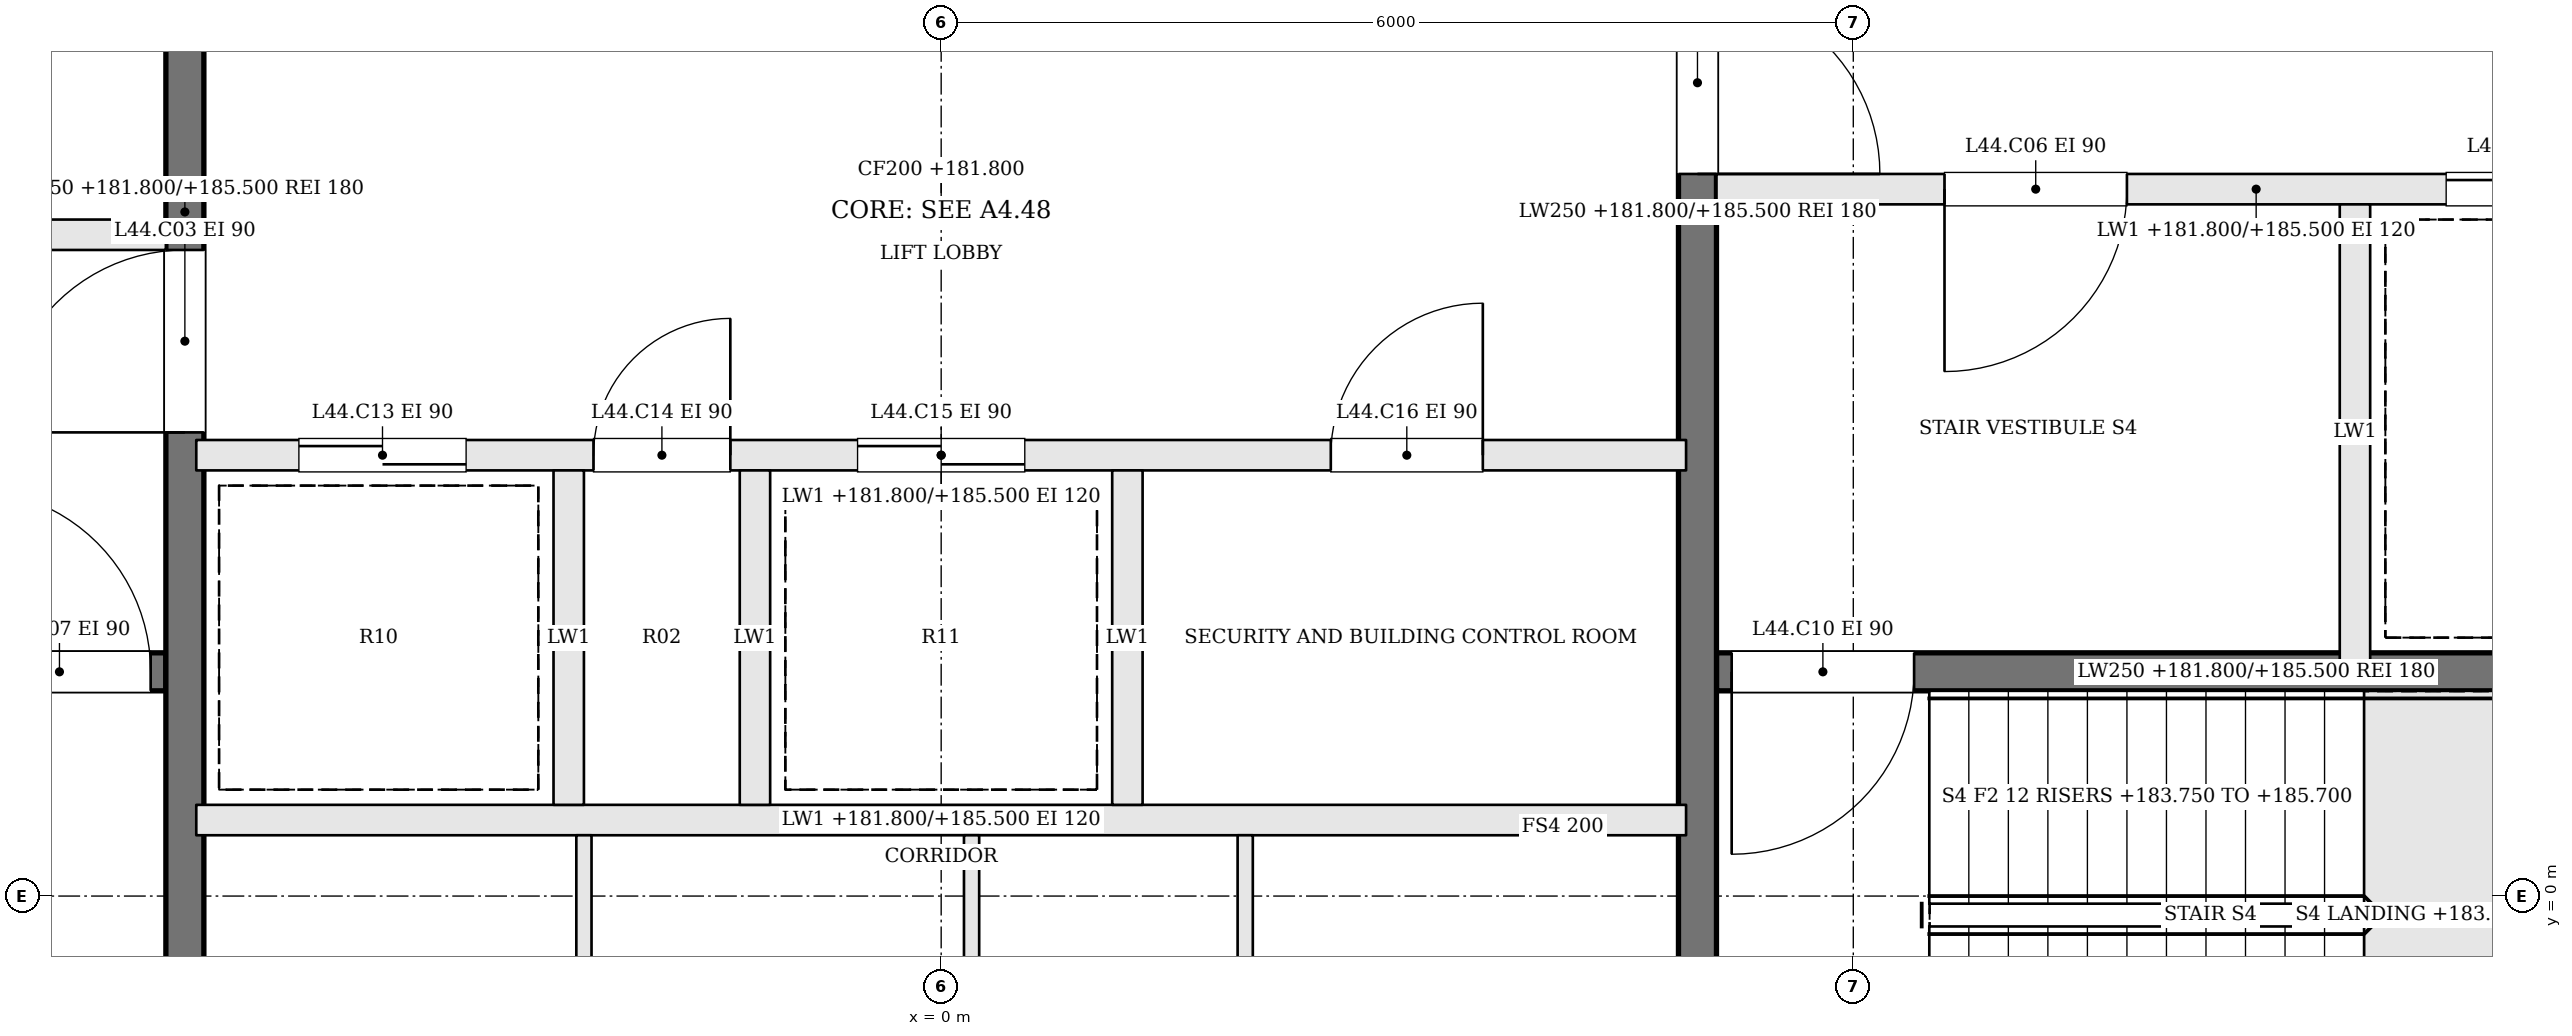
"""IFC4 building model, lengths in metres.
Left out: names, types, materials, properties, quantities, classifications, styles, units other than length and angle.
Written with IfcOpenShell. Run it as: python <this file> out.ifc"""

import sys

from ifc_helpers import new_model, si_unit, direction, frame, frame_2d, origin, place, context, subcontext, project, spatial, rectangle, extrude, element, fill, save


model = new_model("IFC4")
c1 = context("Model", 3, precision=1e-05, world=origin(), true_north=direction((0.0, 1.0)))
c2 = subcontext(c1, "Body", "Model", "MODEL_VIEW")
j1 = project(units=[si_unit("LENGTHUNIT", "METRE"), si_unit("PLANEANGLEUNIT", "RADIAN")], contexts=[c1])
p1 = place(None, origin())
s1 = spatial("IfcSite", under=j1, at=p1, CompositionType="ELEMENT")
p2 = place(p1, origin())
s2 = spatial("IfcBuilding", under=s1, at=p2, CompositionType="ELEMENT")
p3 = place(p2, frame((0.0, 0.0, 181.8)))
s3 = spatial("IfcBuildingStorey", under=s2, at=p3, CompositionType="ELEMENT", Elevation=181.8)
p4 = place(p3, frame((-12.2, 1.475, 0.0), z_axis=(0.0, 0.0, 1.0), x_axis=(1.0, 0.0, 0.0)))
e1 = element("IfcWall", 1, at=p4, inside=s3, PredefinedType="SOLIDWALL", context=c2, shape_type="SweptSolid", body=[
    extrude(rectangle(XDim=7.1, YDim=0.25, at=frame_2d((3.55, 0.0))), origin(), (0.0, 0.0, 1.0), 3.7),
])
p5 = place(p4, frame((5.8, 0.0, 0.0)))
e2 = element("IfcOpeningElement", 2, at=p5, cuts=e1, PredefinedType="OPENING", context=c2, shape_type="SweptSolid", body=[
    extrude(rectangle(XDim=1.2, YDim=2.1, at=frame_2d((0.6, 1.05))), frame((0.0, 0.135, 0.0), z_axis=(0.0, -1.0, 0.0), x_axis=(1.0, 0.0, 0.0)), (0.0, 0.0, 1.0), 0.27),
])
p6 = place(p3, frame((-12.2, 4.35, 0.0), z_axis=(0.0, 0.0, 1.0), x_axis=(1.0, 0.0, 0.0)))
e3 = element("IfcWall", 3, at=p6, inside=s3, PredefinedType="SOLIDWALL", context=c2, shape_type="SweptSolid", body=[
    extrude(rectangle(XDim=7.1, YDim=0.2, at=frame_2d((3.55, 0.0))), origin(), (0.0, 0.0, 1.0), 3.7),
])
p7 = place(p6, frame((4.4, 0.0, 0.0)))
e4 = element("IfcOpeningElement", 4, at=p7, cuts=e3, PredefinedType="OPENING", context=c2, shape_type="SweptSolid", body=[
    extrude(rectangle(XDim=1.2, YDim=2.1, at=frame_2d((0.6, 1.05))), frame((0.0, 0.11, 0.0), z_axis=(0.0, -1.0, 0.0), x_axis=(1.0, 0.0, 0.0)), (0.0, 0.0, 1.0), 0.22),
])
p8 = place(p6, frame((1.1, 0.0, 0.0)))
e5 = element("IfcOpeningElement", 5, at=p8, cuts=e3, PredefinedType="OPENING", context=c2, shape_type="SweptSolid", body=[
    extrude(rectangle(XDim=1.2, YDim=2.1, at=frame_2d((0.6, 1.05))), frame((0.0, 0.11, 0.0), z_axis=(0.0, -1.0, 0.0), x_axis=(1.0, 0.0, 0.0)), (0.0, 0.0, 1.0), 0.22),
])
p9 = place(p3, frame((12.2, 4.65, 0.0), z_axis=(0.0, 0.0, 1.0), x_axis=(-1.0, 0.0, 0.0)))
e6 = element("IfcWall", 6, at=p9, inside=s3, PredefinedType="SOLIDWALL", context=c2, shape_type="SweptSolid", body=[
    extrude(rectangle(XDim=7.1, YDim=0.2, at=frame_2d((3.55, 0.0))), origin(), (0.0, 0.0, 1.0), 3.7),
])
p10 = place(p9, frame((4.4, 0.0, 0.0)))
e7 = element("IfcOpeningElement", 7, at=p10, cuts=e6, PredefinedType="OPENING", context=c2, shape_type="SweptSolid", body=[
    extrude(rectangle(XDim=1.2, YDim=2.1, at=frame_2d((0.6, 1.05))), frame((0.0, 0.11, 0.0), z_axis=(0.0, -1.0, 0.0), x_axis=(1.0, 0.0, 0.0)), (0.0, 0.0, 1.0), 0.22),
])
p11 = place(p9, frame((1.1, 0.0, 0.0)))
e8 = element("IfcOpeningElement", 8, at=p11, cuts=e6, PredefinedType="OPENING", context=c2, shape_type="SweptSolid", body=[
    extrude(rectangle(XDim=1.2, YDim=2.1, at=frame_2d((0.6, 1.05))), frame((0.0, 0.11, 0.0), z_axis=(0.0, -1.0, 0.0), x_axis=(1.0, 0.0, 0.0)), (0.0, 0.0, 1.0), 0.22),
])
p12 = place(p3, frame((12.2, 1.475, 0.0), z_axis=(0.0, 0.0, 1.0), x_axis=(-1.0, 0.0, 0.0)))
e9 = element("IfcWall", 9, at=p12, inside=s3, PredefinedType="SOLIDWALL", context=c2, shape_type="SweptSolid", body=[
    extrude(rectangle(XDim=7.1, YDim=0.25, at=frame_2d((3.55, 0.0))), origin(), (0.0, 0.0, 1.0), 3.7),
])
p13 = place(p12, frame((5.8, 0.0, 0.0)))
e10 = element("IfcOpeningElement", 10, at=p13, cuts=e9, PredefinedType="OPENING", context=c2, shape_type="SweptSolid", body=[
    extrude(rectangle(XDim=1.2, YDim=2.1, at=frame_2d((0.6, 1.05))), frame((0.0, 0.135, 0.0), z_axis=(0.0, -1.0, 0.0), x_axis=(1.0, 0.0, 0.0)), (0.0, 0.0, 1.0), 0.27),
])
p14 = place(p3, frame((9.3, 4.55, 0.0), z_axis=(0.0, 0.0, 1.0), x_axis=(0.0, -1.0, 0.0)))
e11 = element("IfcWall", 11, at=p14, inside=s3, PredefinedType="SOLIDWALL", context=c2, shape_type="SweptSolid", body=[
    extrude(rectangle(XDim=3.0, YDim=0.2, at=frame_2d((1.5, 0.0))), origin(), (0.0, 0.0, 1.0), 3.7),
])
p15 = place(p3, frame((-4.975, -2.2, 0.0), z_axis=(0.0, 0.0, 1.0), x_axis=(0.0, 1.0, 0.0)))
e12 = element("IfcWall", 12, at=p15, inside=s3, PredefinedType="SOLIDWALL", context=c2, shape_type="SweptSolid", body=[
    extrude(rectangle(XDim=13.4, YDim=0.25, at=frame_2d((6.7, 0.0))), origin(), (0.0, 0.0, 1.0), 3.7),
])
p16 = place(p15, frame((5.25, 0.0, 0.0)))
e13 = element("IfcOpeningElement", 13, at=p16, cuts=e12, PredefinedType="OPENING", context=c2, shape_type="SweptSolid", body=[
    extrude(rectangle(XDim=1.2, YDim=2.1, at=frame_2d((0.6, 1.05))), frame((0.0, 0.135, 0.0), z_axis=(0.0, -1.0, 0.0), x_axis=(1.0, 0.0, 0.0)), (0.0, 0.0, 1.0), 0.27),
])
p17 = place(p3, frame((4.975, 11.2, 0.0), z_axis=(0.0, 0.0, 1.0), x_axis=(0.0, -1.0, 0.0)))
e14 = element("IfcWall", 14, at=p17, inside=s3, PredefinedType="SOLIDWALL", context=c2, shape_type="SweptSolid", body=[
    extrude(rectangle(XDim=13.4, YDim=0.25, at=frame_2d((6.7, 0.0))), origin(), (0.0, 0.0, 1.0), 3.7),
])
p18 = place(p17, frame((5.25, 0.0, 0.0)))
e15 = element("IfcOpeningElement", 15, at=p18, cuts=e14, PredefinedType="OPENING", context=c2, shape_type="SweptSolid", body=[
    extrude(rectangle(XDim=1.2, YDim=2.1, at=frame_2d((0.6, 1.05))), frame((0.0, 0.135, 0.0), z_axis=(0.0, -1.0, 0.0), x_axis=(1.0, 0.0, 0.0)), (0.0, 0.0, 1.0), 0.27),
])
p19 = place(p3, frame((-4.9, 0.5, 0.0), z_axis=(0.0, 0.0, 1.0), x_axis=(1.0, 0.0, 0.0)))
e16 = element("IfcWall", 16, at=p19, inside=s3, PredefinedType="SOLIDWALL", context=c2, shape_type="SweptSolid", body=[
    extrude(rectangle(XDim=9.8, YDim=0.2, at=frame_2d((4.9, 0.0))), origin(), (0.0, 0.0, 1.0), 3.7),
])
p20 = place(p3, frame((-4.9, 2.9, 0.0), z_axis=(0.0, 0.0, 1.0), x_axis=(1.0, 0.0, 0.0)))
e17 = element("IfcWall", 17, at=p20, inside=s3, PredefinedType="SOLIDWALL", context=c2, shape_type="SweptSolid", body=[
    extrude(rectangle(XDim=9.8, YDim=0.2, at=frame_2d((4.9, 0.0))), origin(), (0.0, 0.0, 1.0), 3.7),
])
p21 = place(p20, frame((0.675, 0.0, 0.0)))
e18 = element("IfcOpeningElement", 18, at=p21, cuts=e17, PredefinedType="OPENING", context=c2, shape_type="SweptSolid", body=[
    extrude(rectangle(XDim=1.1, YDim=2.1, at=frame_2d((0.55, 1.05))), frame((0.0, 0.11, 0.0), z_axis=(0.0, -1.0, 0.0), x_axis=(1.0, 0.0, 0.0)), (0.0, 0.0, 1.0), 0.22),
])
p22 = place(p20, frame((2.613, 0.0, 0.0)))
e19 = element("IfcOpeningElement", 19, at=p22, cuts=e17, PredefinedType="OPENING", context=c2, shape_type="SweptSolid", body=[
    extrude(rectangle(XDim=0.9, YDim=2.1, at=frame_2d((0.45, 1.05))), frame((0.0, 0.11, 0.0), z_axis=(0.0, -1.0, 0.0), x_axis=(1.0, 0.0, 0.0)), (0.0, 0.0, 1.0), 0.22),
])
p23 = place(p20, frame((4.35, 0.0, 0.0)))
e20 = element("IfcOpeningElement", 20, at=p23, cuts=e17, PredefinedType="OPENING", context=c2, shape_type="SweptSolid", body=[
    extrude(rectangle(XDim=1.1, YDim=2.1, at=frame_2d((0.55, 1.05))), frame((0.0, 0.11, 0.0), z_axis=(0.0, -1.0, 0.0), x_axis=(1.0, 0.0, 0.0)), (0.0, 0.0, 1.0), 0.22),
])
p24 = place(p20, frame((7.463, 0.0, 0.0)))
e21 = element("IfcOpeningElement", 21, at=p24, cuts=e17, PredefinedType="OPENING", context=c2, shape_type="SweptSolid", body=[
    extrude(rectangle(XDim=1.0, YDim=2.1, at=frame_2d((0.5, 1.05))), frame((0.0, 0.11, 0.0), z_axis=(0.0, -1.0, 0.0), x_axis=(1.0, 0.0, 0.0)), (0.0, 0.0, 1.0), 0.22),
])
for number, where, z_axis, x_axis in (
    (22, (-2.45, 0.6, 0.0), (0.0, 0.0, 1.0), (0.0, 1.0, 0.0)),
    (23, (-1.225, 0.6, 0.0), (0.0, 0.0, 1.0), (0.0, 1.0, 0.0)),
    (24, (1.225, 0.6, 0.0), (0.0, 0.0, 1.0), (0.0, 1.0, 0.0)),
):
    element("IfcWall", number, at=place(p3, frame(where, z_axis=z_axis, x_axis=x_axis)), inside=s3, PredefinedType="SOLIDWALL", context=c2, shape_type="SweptSolid", body=[
        extrude(rectangle(XDim=2.2, YDim=0.2, at=frame_2d((1.1, 0.0))), origin(), (0.0, 0.0, 1.0), 3.7),
    ])
for number, where, z_axis, x_axis in (
    (25, (-2.35, -2.2, 0.0), (0.0, 0.0, 1.0), (0.0, 1.0, 0.0)),
    (26, (0.2, -2.2, 0.0), (0.0, 0.0, 1.0), (0.0, 1.0, 0.0)),
    (27, (2.0, -2.2, 0.0), (0.0, 0.0, 1.0), (0.0, 1.0, 0.0)),
):
    element("IfcWall", number, at=place(p3, frame(where, z_axis=z_axis, x_axis=x_axis)), inside=s3, PredefinedType="PARTITIONING", context=c2, shape_type="SweptSolid", body=[
        extrude(rectangle(XDim=2.6, YDim=0.1, at=frame_2d((1.3, 0.0))), origin(), (0.0, 0.0, 1.0), 3.7),
    ])
p25 = place(p16, origin())
e28 = element("IfcDoor", 28, at=p25, inside=s3, OperationType="SINGLE_SWING_LEFT", PredefinedType="DOOR", context=c2, shape_type="SweptSolid", body=[
    extrude(rectangle(XDim=1.2, YDim=2.1, at=frame_2d((0.6, 1.05))), frame((0.0, 0.025, 0.0), z_axis=(0.0, -1.0, 0.0), x_axis=(1.0, 0.0, 0.0)), (0.0, 0.0, 1.0), 0.05),
])
fill(e13, e28)
p26 = place(p18, origin())
e29 = element("IfcDoor", 29, at=p26, inside=s3, OperationType="SINGLE_SWING_RIGHT", PredefinedType="DOOR", context=c2, shape_type="SweptSolid", body=[
    extrude(rectangle(XDim=1.2, YDim=2.1, at=frame_2d((0.6, 1.05))), frame((0.0, 0.025, 0.0), z_axis=(0.0, -1.0, 0.0), x_axis=(1.0, 0.0, 0.0)), (0.0, 0.0, 1.0), 0.05),
])
fill(e15, e29)
p27 = place(p10, origin())
e30 = element("IfcDoor", 30, at=p27, inside=s3, OperationType="SINGLE_SWING_RIGHT", PredefinedType="DOOR", context=c2, shape_type="SweptSolid", body=[
    extrude(rectangle(XDim=1.2, YDim=2.1, at=frame_2d((0.6, 1.05))), frame((0.0, 0.025, 0.0), z_axis=(0.0, -1.0, 0.0), x_axis=(1.0, 0.0, 0.0)), (0.0, 0.0, 1.0), 0.05),
])
fill(e7, e30)
p28 = place(p5, origin())
e31 = element("IfcDoor", 31, at=p28, inside=s3, OperationType="SINGLE_SWING_LEFT", PredefinedType="DOOR", context=c2, shape_type="SweptSolid", body=[
    extrude(rectangle(XDim=1.2, YDim=2.1, at=frame_2d((0.6, 1.05))), frame((0.0, 0.025, 0.0), z_axis=(0.0, -1.0, 0.0), x_axis=(1.0, 0.0, 0.0)), (0.0, 0.0, 1.0), 0.05),
])
fill(e2, e31)
p29 = place(p13, origin())
e32 = element("IfcDoor", 32, at=p29, inside=s3, OperationType="SINGLE_SWING_RIGHT", PredefinedType="DOOR", context=c2, shape_type="SweptSolid", body=[
    extrude(rectangle(XDim=1.2, YDim=2.1, at=frame_2d((0.6, 1.05))), frame((0.0, 0.025, 0.0), z_axis=(0.0, -1.0, 0.0), x_axis=(1.0, 0.0, 0.0)), (0.0, 0.0, 1.0), 0.05),
])
fill(e10, e32)
p30 = place(p11, origin())
e33 = element("IfcDoor", 33, at=p30, inside=s3, OperationType="SLIDING_TO_RIGHT", PredefinedType="DOOR", context=c2, shape_type="SweptSolid", body=[
    extrude(rectangle(XDim=1.2, YDim=2.1, at=frame_2d((0.6, 1.05))), frame((0.0, 0.025, 0.0), z_axis=(0.0, -1.0, 0.0), x_axis=(1.0, 0.0, 0.0)), (0.0, 0.0, 1.0), 0.05),
])
fill(e8, e33)
p31 = place(p21, origin())
e34 = element("IfcDoor", 34, at=p31, inside=s3, OperationType="SLIDING_TO_RIGHT", PredefinedType="DOOR", context=c2, shape_type="SweptSolid", body=[
    extrude(rectangle(XDim=1.1, YDim=2.1, at=frame_2d((0.55, 1.05))), frame((0.0, 0.025, 0.0), z_axis=(0.0, -1.0, 0.0), x_axis=(1.0, 0.0, 0.0)), (0.0, 0.0, 1.0), 0.05),
])
fill(e18, e34)
p32 = place(p22, origin())
e35 = element("IfcDoor", 35, at=p32, inside=s3, OperationType="SINGLE_SWING_RIGHT", PredefinedType="DOOR", context=c2, shape_type="SweptSolid", body=[
    extrude(rectangle(XDim=0.9, YDim=2.1, at=frame_2d((0.45, 1.05))), frame((0.0, 0.025, 0.0), z_axis=(0.0, -1.0, 0.0), x_axis=(1.0, 0.0, 0.0)), (0.0, 0.0, 1.0), 0.05),
])
fill(e19, e35)
p33 = place(p23, origin())
e36 = element("IfcDoor", 36, at=p33, inside=s3, OperationType="SLIDING_TO_LEFT", PredefinedType="DOOR", context=c2, shape_type="SweptSolid", body=[
    extrude(rectangle(XDim=1.1, YDim=2.1, at=frame_2d((0.55, 1.05))), frame((0.0, 0.025, 0.0), z_axis=(0.0, -1.0, 0.0), x_axis=(1.0, 0.0, 0.0)), (0.0, 0.0, 1.0), 0.05),
])
fill(e20, e36)
p34 = place(p24, origin())
e37 = element("IfcDoor", 37, at=p34, inside=s3, OperationType="SINGLE_SWING_RIGHT", PredefinedType="DOOR", context=c2, shape_type="SweptSolid", body=[
    extrude(rectangle(XDim=1.0, YDim=2.1, at=frame_2d((0.5, 1.05))), frame((0.0, 0.025, 0.0), z_axis=(0.0, -1.0, 0.0), x_axis=(1.0, 0.0, 0.0)), (0.0, 0.0, 1.0), 0.05),
])
fill(e21, e37)
save(model, sys.argv[1])
